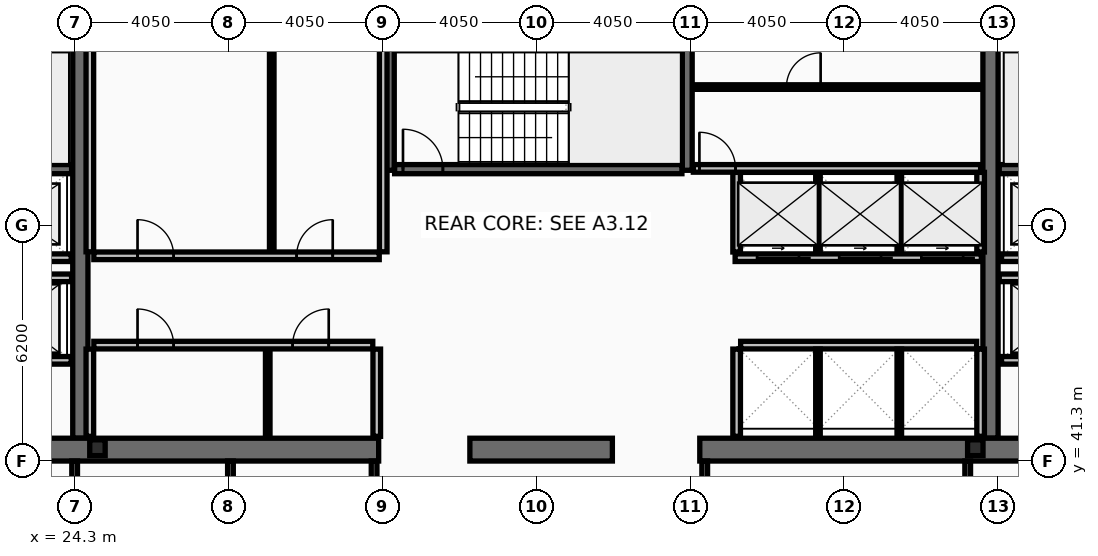
"""IFC4 building model, lengths in metres.
Left out: names, types, materials, properties, quantities, classifications, styles, units other than length and angle.
Written with IfcOpenShell. Run it as: python <this file> out.ifc"""

import sys

from ifc_helpers import new_model, si_unit, direction, frame, frame_2d, origin, origin_2d, place, context, subcontext, project, spatial, rectangle, i_section, extrude, element, fill, save


model = new_model("IFC4")
c1 = context("Model", 3, precision=1e-05, world=origin(), true_north=direction((0.0, 1.0)))
c2 = subcontext(c1, "Body", "Model", "MODEL_VIEW")
j1 = project(units=[si_unit("LENGTHUNIT", "METRE"), si_unit("PLANEANGLEUNIT", "RADIAN")], contexts=[c1])
p1 = place(None, origin())
s1 = spatial("IfcSite", under=j1, at=p1, CompositionType="ELEMENT")
p2 = place(p1, origin())
s2 = spatial("IfcBuilding", under=s1, at=p2, CompositionType="ELEMENT")
p3 = place(p2, frame((0.0, 0.0, 221.0)))
s3 = spatial("IfcBuildingStorey", under=s2, at=p3, CompositionType="ELEMENT", Elevation=221.0)
for number, where, z_axis, x_axis in (
    (1, (24.45, 41.9, 0.0), (0.0, 0.0, 1.0), (0.0, 1.0, 0.0)),
    (2, (48.4, 41.9, 0.0), (0.0, 0.0, 1.0), (0.0, 1.0, 0.0)),
):
    element("IfcWall", number, at=place(p3, frame(where, z_axis=z_axis, x_axis=x_axis)), inside=s3, PredefinedType="SHEAR", context=c2, shape_type="SweptSolid", body=[
        extrude(rectangle(XDim=11.2, YDim=0.4, at=frame_2d((5.6, 0.0))), origin(), (0.0, 0.0, 1.0), 3.44),
    ])
p4 = place(p3, frame((32.3, 41.6, 0.0), z_axis=(0.0, 0.0, 1.0), x_axis=(-1.0, 0.0, 0.0)))
e3 = element("IfcWall", 3, at=p4, inside=s3, PredefinedType="SHEAR", context=c2, shape_type="SweptSolid", body=[
    extrude(rectangle(XDim=11.45, YDim=0.6, at=frame_2d((5.725, 0.0))), origin(), (0.0, 0.0, 1.0), 3.44),
])
p5 = place(p3, frame((38.45, 41.6, 0.0), z_axis=(0.0, 0.0, 1.0), x_axis=(-1.0, 0.0, 0.0)))
e4 = element("IfcWall", 4, at=p5, inside=s3, PredefinedType="SHEAR", context=c2, shape_type="SweptSolid", body=[
    extrude(rectangle(XDim=3.75, YDim=0.6, at=frame_2d((1.875, 0.0))), origin(), (0.0, 0.0, 1.0), 3.44),
])
p6 = place(p3, frame((52.05, 41.6, 0.0), z_axis=(0.0, 0.0, 1.0), x_axis=(-1.0, 0.0, 0.0)))
e5 = element("IfcWall", 5, at=p6, inside=s3, PredefinedType="SHEAR", context=c2, shape_type="SweptSolid", body=[
    extrude(rectangle(XDim=11.3, YDim=0.6, at=frame_2d((5.65, 0.0))), origin(), (0.0, 0.0, 1.0), 3.44),
])
for number, where, z_axis, x_axis in (
    (6, (32.58, 48.95, 0.0), (0.0, 0.0, 1.0), (0.0, 1.0, 0.0)),
    (7, (40.42, 48.95, 0.0), (0.0, 0.0, 1.0), (0.0, 1.0, 0.0)),
):
    element("IfcWall", number, at=place(p3, frame(where, z_axis=z_axis, x_axis=x_axis)), inside=s3, PredefinedType="SHEAR", context=c2, shape_type="SweptSolid", body=[
        extrude(rectangle(XDim=4.15, YDim=0.26, at=frame_2d((2.075, 0.0))), origin(), (0.0, 0.0, 1.0), 3.44),
    ])
p7 = place(p3, frame((16.8, 48.98, 0.0), z_axis=(0.0, 0.0, 1.0), x_axis=(1.0, 0.0, 0.0)))
e8 = element("IfcWall", 8, at=p7, inside=s3, PredefinedType="SHEAR", context=c2, shape_type="SweptSolid", body=[
    extrude(rectangle(XDim=7.42, YDim=0.24, at=frame_2d((3.71, 0.0))), origin(), (0.0, 0.0, 1.0), 3.44),
])
p8 = place(p7, frame((0.22, 0.0, 0.0)))
e9 = element("IfcOpeningElement", 9, at=p8, cuts=e8, PredefinedType="OPENING", context=c2, shape_type="SweptSolid", body=[
    extrude(rectangle(XDim=1.05, YDim=2.15, at=frame_2d((0.525, 1.075))), frame((0.0, 0.13, 0.0), z_axis=(0.0, -1.0, 0.0), x_axis=(1.0, 0.0, 0.0)), (0.0, 0.0, 1.0), 0.26),
])
p9 = place(p3, frame((48.63, 48.98, 0.0), z_axis=(0.0, 0.0, 1.0), x_axis=(1.0, 0.0, 0.0)))
e10 = element("IfcWall", 10, at=p9, inside=s3, PredefinedType="SHEAR", context=c2, shape_type="SweptSolid", body=[
    extrude(rectangle(XDim=7.47, YDim=0.24, at=frame_2d((3.735, 0.0))), origin(), (0.0, 0.0, 1.0), 3.44),
])
p10 = place(p9, frame((6.2, 0.0, 0.0)))
e11 = element("IfcOpeningElement", 11, at=p10, cuts=e10, PredefinedType="OPENING", context=c2, shape_type="SweptSolid", body=[
    extrude(rectangle(XDim=1.05, YDim=2.15, at=frame_2d((0.525, 1.075))), frame((0.0, 0.13, 0.0), z_axis=(0.0, -1.0, 0.0), x_axis=(1.0, 0.0, 0.0)), (0.0, 0.0, 1.0), 0.26),
])
p11 = place(p3, frame((32.72, 48.98, 0.0), z_axis=(0.0, 0.0, 1.0), x_axis=(1.0, 0.0, 0.0)))
e12 = element("IfcWall", 12, at=p11, inside=s3, PredefinedType="SHEAR", context=c2, shape_type="SweptSolid", body=[
    extrude(rectangle(XDim=7.56, YDim=0.24, at=frame_2d((3.78, 0.0))), origin(), (0.0, 0.0, 1.0), 3.44),
])
p12 = place(p11, frame((0.22, 0.0, 0.0)))
e13 = element("IfcOpeningElement", 13, at=p12, cuts=e12, PredefinedType="OPENING", context=c2, shape_type="SweptSolid", body=[
    extrude(rectangle(XDim=1.05, YDim=2.15, at=frame_2d((0.525, 1.075))), frame((0.0, 0.13, 0.0), z_axis=(0.0, -1.0, 0.0), x_axis=(1.0, 0.0, 0.0)), (0.0, 0.0, 1.0), 0.26),
])
for number, where, z_axis, x_axis in (
    (14, (24.9, 41.65, 0.0), (0.0, 0.0, 1.0), (1.0, 0.0, 0.0)),
    (15, (48.0, 41.65, 0.0), (0.0, 0.0, 1.0), (1.0, 0.0, 0.0)),
):
    element("IfcColumn", number, at=place(p3, frame(where, z_axis=z_axis, x_axis=x_axis)), inside=s3, PredefinedType="COLUMN", context=c2, shape_type="SweptSolid", body=[
        extrude(i_section(OverallWidth=0.406, OverallDepth=0.416, WebThickness=0.03, FlangeThickness=0.048, at=origin_2d()), origin(), (0.0, 0.0, 1.0), 3.6),
    ])
p13 = place(p3, frame((51.61, 43.95, 0.0), z_axis=(0.0, 0.0, 1.0), x_axis=(-1.0, 0.0, 0.0)))
e16 = element("IfcWall", 16, at=p13, inside=s3, PredefinedType="PARTITIONING", context=c2, shape_type="SweptSolid", body=[
    extrude(rectangle(XDim=2.92, YDim=0.2, at=frame_2d((1.46, 0.0))), origin(), (0.0, 0.0, 1.0), 3.44),
])
p14 = place(p13, frame((0.81, 0.0, 0.0)))
e17 = element("IfcOpeningElement", 17, at=p14, cuts=e16, PredefinedType="OPENING", context=c2, shape_type="SweptSolid", body=[
    extrude(rectangle(XDim=1.3, YDim=2.18, at=frame_2d((0.65, 1.09))), frame((0.0, 0.11, 0.0), z_axis=(0.0, -1.0, 0.0), x_axis=(1.0, 0.0, 0.0)), (0.0, 0.0, 1.0), 0.22),
])
p15 = place(p3, frame((24.21, 43.95, 0.0), z_axis=(0.0, 0.0, 1.0), x_axis=(-1.0, 0.0, 0.0)))
e18 = element("IfcWall", 18, at=p15, inside=s3, PredefinedType="PARTITIONING", context=c2, shape_type="SweptSolid", body=[
    extrude(rectangle(XDim=2.97, YDim=0.2, at=frame_2d((1.485, 0.0))), origin(), (0.0, 0.0, 1.0), 3.44),
])
p16 = place(p15, frame((0.86, 0.0, 0.0)))
e19 = element("IfcOpeningElement", 19, at=p16, cuts=e18, PredefinedType="OPENING", context=c2, shape_type="SweptSolid", body=[
    extrude(rectangle(XDim=1.3, YDim=2.18, at=frame_2d((0.65, 1.09))), frame((0.0, 0.11, 0.0), z_axis=(0.0, -1.0, 0.0), x_axis=(1.0, 0.0, 0.0)), (0.0, 0.0, 1.0), 0.22),
])
p17 = place(p3, frame((51.61, 46.65, 0.0), z_axis=(0.0, 0.0, 1.0), x_axis=(-1.0, 0.0, 0.0)))
e20 = element("IfcWall", 20, at=p17, inside=s3, PredefinedType="PARTITIONING", context=c2, shape_type="SweptSolid", body=[
    extrude(rectangle(XDim=2.92, YDim=0.2, at=frame_2d((1.46, 0.0))), origin(), (0.0, 0.0, 1.0), 3.44),
])
p18 = place(p17, frame((0.86, 0.0, 0.0)))
e21 = element("IfcOpeningElement", 21, at=p18, cuts=e20, PredefinedType="OPENING", context=c2, shape_type="SweptSolid", body=[
    extrude(rectangle(XDim=1.2, YDim=2.18, at=frame_2d((0.6, 1.09))), frame((0.0, 0.11, 0.0), z_axis=(0.0, -1.0, 0.0), x_axis=(1.0, 0.0, 0.0)), (0.0, 0.0, 1.0), 0.22),
])
p19 = place(p3, frame((24.21, 46.65, 0.0), z_axis=(0.0, 0.0, 1.0), x_axis=(-1.0, 0.0, 0.0)))
e22 = element("IfcWall", 22, at=p19, inside=s3, PredefinedType="PARTITIONING", context=c2, shape_type="SweptSolid", body=[
    extrude(rectangle(XDim=2.97, YDim=0.2, at=frame_2d((1.485, 0.0))), origin(), (0.0, 0.0, 1.0), 3.44),
])
p20 = place(p19, frame((0.91, 0.0, 0.0)))
e23 = element("IfcOpeningElement", 23, at=p20, cuts=e22, PredefinedType="OPENING", context=c2, shape_type="SweptSolid", body=[
    extrude(rectangle(XDim=1.2, YDim=2.18, at=frame_2d((0.6, 1.09))), frame((0.0, 0.11, 0.0), z_axis=(0.0, -1.0, 0.0), x_axis=(1.0, 0.0, 0.0)), (0.0, 0.0, 1.0), 0.22),
])
p21 = place(p3, frame((48.16, 46.65, 0.0), z_axis=(0.0, 0.0, 1.0), x_axis=(-1.0, 0.0, 0.0)))
e24 = element("IfcWall", 24, at=p21, inside=s3, PredefinedType="PARTITIONING", context=c2, shape_type="SweptSolid", body=[
    extrude(rectangle(XDim=6.48, YDim=0.2, at=frame_2d((3.24, 0.0))), origin(), (0.0, 0.0, 1.0), 3.44),
])
p22 = place(p21, frame((4.8, 0.0, 0.0)))
e25 = element("IfcOpeningElement", 25, at=p22, cuts=e24, PredefinedType="OPENING", context=c2, shape_type="SweptSolid", body=[
    extrude(rectangle(XDim=1.1, YDim=2.18, at=frame_2d((0.55, 1.09))), frame((0.0, 0.11, 0.0), z_axis=(0.0, -1.0, 0.0), x_axis=(1.0, 0.0, 0.0)), (0.0, 0.0, 1.0), 0.22),
])
p23 = place(p21, frame((2.64, 0.0, 0.0)))
e26 = element("IfcOpeningElement", 26, at=p23, cuts=e24, PredefinedType="OPENING", context=c2, shape_type="SweptSolid", body=[
    extrude(rectangle(XDim=1.1, YDim=2.18, at=frame_2d((0.55, 1.09))), frame((0.0, 0.11, 0.0), z_axis=(0.0, -1.0, 0.0), x_axis=(1.0, 0.0, 0.0)), (0.0, 0.0, 1.0), 0.22),
])
p24 = place(p21, frame((0.48, 0.0, 0.0)))
e27 = element("IfcOpeningElement", 27, at=p24, cuts=e24, PredefinedType="OPENING", context=c2, shape_type="SweptSolid", body=[
    extrude(rectangle(XDim=1.1, YDim=2.18, at=frame_2d((0.55, 1.09))), frame((0.0, 0.11, 0.0), z_axis=(0.0, -1.0, 0.0), x_axis=(1.0, 0.0, 0.0)), (0.0, 0.0, 1.0), 0.22),
])
p25 = place(p3, frame((21.2, 46.12, 0.0), z_axis=(0.0, 0.0, 1.0), x_axis=(1.0, 0.0, 0.0)))
e28 = element("IfcWall", 28, at=p25, inside=s3, PredefinedType="PARTITIONING", context=c2, shape_type="SweptSolid", body=[
    extrude(rectangle(XDim=3.02, YDim=0.2, at=frame_2d((1.51, 0.0))), origin(), (0.0, 0.0, 1.0), 3.44),
])
p26 = place(p3, frame((48.63, 46.12, 0.0), z_axis=(0.0, 0.0, 1.0), x_axis=(1.0, 0.0, 0.0)))
e29 = element("IfcWall", 29, at=p26, inside=s3, PredefinedType="PARTITIONING", context=c2, shape_type="SweptSolid", body=[
    extrude(rectangle(XDim=3.07, YDim=0.2, at=frame_2d((1.535, 0.0))), origin(), (0.0, 0.0, 1.0), 3.44),
])
for number, where, z_axis, x_axis in (
    (30, (24.7, 46.805, 0.0), (0.0, 0.0, 1.0), (0.0, 1.0, 0.0)),
    (31, (32.42, 46.805, 0.0), (0.0, 0.0, 1.0), (0.0, 1.0, 0.0)),
):
    element("IfcWall", number, at=place(p3, frame(where, z_axis=z_axis, x_axis=x_axis)), inside=s3, PredefinedType="PARTITIONING", context=c2, shape_type="SweptSolid", body=[
        extrude(rectangle(XDim=5.99, YDim=0.2, at=frame_2d((2.995, 0.0))), origin(), (0.0, 0.0, 1.0), 3.44),
    ])
p27 = place(p3, frame((29.486, 46.805, 0.0), z_axis=(0.0, 0.0, 1.0), x_axis=(0.0, 1.0, 0.0)))
e32 = element("IfcWall", 32, at=p27, inside=s3, PredefinedType="PARTITIONING", context=c2, shape_type="SweptSolid", body=[
    extrude(rectangle(XDim=5.99, YDim=0.12, at=frame_2d((2.995, 0.0))), origin(), (0.0, 0.0, 1.0), 3.44),
])
p28 = place(p3, frame((24.805, 46.7, 0.0), z_axis=(0.0, 0.0, 1.0), x_axis=(1.0, 0.0, 0.0)))
e33 = element("IfcWall", 33, at=p28, inside=s3, PredefinedType="PARTITIONING", context=c2, shape_type="SweptSolid", body=[
    extrude(rectangle(XDim=7.51, YDim=0.2, at=frame_2d((3.755, 0.0))), origin(), (0.0, 0.0, 1.0), 3.44),
])
p29 = place(p28, frame((1.15, 0.0, 0.0)))
e34 = element("IfcOpeningElement", 34, at=p29, cuts=e33, PredefinedType="OPENING", context=c2, shape_type="SweptSolid", body=[
    extrude(rectangle(XDim=0.95, YDim=2.1, at=frame_2d((0.475, 1.05))), frame((0.0, 0.11, 0.0), z_axis=(0.0, -1.0, 0.0), x_axis=(1.0, 0.0, 0.0)), (0.0, 0.0, 1.0), 0.22),
])
p30 = place(p28, frame((5.336, 0.0, 0.0)))
e35 = element("IfcOpeningElement", 35, at=p30, cuts=e33, PredefinedType="OPENING", context=c2, shape_type="SweptSolid", body=[
    extrude(rectangle(XDim=0.95, YDim=2.1, at=frame_2d((0.475, 1.05))), frame((0.0, 0.11, 0.0), z_axis=(0.0, -1.0, 0.0), x_axis=(1.0, 0.0, 0.0)), (0.0, 0.0, 1.0), 0.22),
])
for number, where, z_axis, x_axis in (
    (36, (24.7, 41.95, 0.0), (0.0, 0.0, 1.0), (0.0, 1.0, 0.0)),
    (37, (32.25, 41.95, 0.0), (0.0, 0.0, 1.0), (0.0, 1.0, 0.0)),
):
    element("IfcWall", number, at=place(p3, frame(where, z_axis=z_axis, x_axis=x_axis)), inside=s3, PredefinedType="PARTITIONING", context=c2, shape_type="SweptSolid", body=[
        extrude(rectangle(XDim=2.295, YDim=0.2, at=frame_2d((1.147, 0.0))), origin(), (0.0, 0.0, 1.0), 3.44),
    ])
p31 = place(p3, frame((29.381, 41.95, 0.0), z_axis=(0.0, 0.0, 1.0), x_axis=(0.0, 1.0, 0.0)))
e38 = element("IfcWall", 38, at=p31, inside=s3, PredefinedType="PARTITIONING", context=c2, shape_type="SweptSolid", body=[
    extrude(rectangle(XDim=2.295, YDim=0.12, at=frame_2d((1.147, 0.0))), origin(), (0.0, 0.0, 1.0), 3.44),
])
p32 = place(p3, frame((24.805, 44.35, 0.0), z_axis=(0.0, 0.0, 1.0), x_axis=(1.0, 0.0, 0.0)))
e39 = element("IfcWall", 39, at=p32, inside=s3, PredefinedType="PARTITIONING", context=c2, shape_type="SweptSolid", body=[
    extrude(rectangle(XDim=7.34, YDim=0.2, at=frame_2d((3.67, 0.0))), origin(), (0.0, 0.0, 1.0), 3.44),
])
p33 = place(p32, frame((1.15, 0.0, 0.0)))
e40 = element("IfcOpeningElement", 40, at=p33, cuts=e39, PredefinedType="OPENING", context=c2, shape_type="SweptSolid", body=[
    extrude(rectangle(XDim=0.95, YDim=2.1, at=frame_2d((0.475, 1.05))), frame((0.0, 0.11, 0.0), z_axis=(0.0, -1.0, 0.0), x_axis=(1.0, 0.0, 0.0)), (0.0, 0.0, 1.0), 0.22),
])
p34 = place(p32, frame((5.231, 0.0, 0.0)))
e41 = element("IfcOpeningElement", 41, at=p34, cuts=e39, PredefinedType="OPENING", context=c2, shape_type="SweptSolid", body=[
    extrude(rectangle(XDim=0.95, YDim=2.1, at=frame_2d((0.475, 1.05))), frame((0.0, 0.11, 0.0), z_axis=(0.0, -1.0, 0.0), x_axis=(1.0, 0.0, 0.0)), (0.0, 0.0, 1.0), 0.22),
])
for number, where, z_axis, x_axis in (
    (42, (41.72, 46.8, 0.0), (0.0, 0.0, 1.0), (0.0, 1.0, 0.0)),
    (43, (48.14, 46.8, 0.0), (0.0, 0.0, 1.0), (0.0, 1.0, 0.0)),
):
    element("IfcWall", number, at=place(p3, frame(where, z_axis=z_axis, x_axis=x_axis)), inside=s3, PredefinedType="PARTITIONING", context=c2, shape_type="SweptSolid", body=[
        extrude(rectangle(XDim=2.095, YDim=0.2, at=frame_2d((1.047, 0.0))), origin(), (0.0, 0.0, 1.0), 3.44),
    ])
for number, where, z_axis, x_axis in (
    (44, (43.86, 46.8, 0.0), (0.0, 0.0, 1.0), (0.0, 1.0, 0.0)),
    (45, (46.0, 46.8, 0.0), (0.0, 0.0, 1.0), (0.0, 1.0, 0.0)),
):
    element("IfcWall", number, at=place(p3, frame(where, z_axis=z_axis, x_axis=x_axis)), inside=s3, PredefinedType="PARTITIONING", context=c2, shape_type="SweptSolid", body=[
        extrude(rectangle(XDim=2.095, YDim=0.12, at=frame_2d((1.047, 0.0))), origin(), (0.0, 0.0, 1.0), 3.44),
    ])
p35 = place(p3, frame((41.825, 44.35, 0.0), z_axis=(0.0, 0.0, 1.0), x_axis=(1.0, 0.0, 0.0)))
e46 = element("IfcWall", 46, at=p35, inside=s3, PredefinedType="PARTITIONING", context=c2, shape_type="SweptSolid", body=[
    extrude(rectangle(XDim=6.21, YDim=0.2, at=frame_2d((3.105, 0.0))), origin(), (0.0, 0.0, 1.0), 3.44),
])
for number, where, z_axis, x_axis in (
    (47, (41.72, 41.95, 0.0), (0.0, 0.0, 1.0), (0.0, 1.0, 0.0)),
    (48, (48.14, 41.95, 0.0), (0.0, 0.0, 1.0), (0.0, 1.0, 0.0)),
):
    element("IfcWall", number, at=place(p3, frame(where, z_axis=z_axis, x_axis=x_axis)), inside=s3, PredefinedType="PARTITIONING", context=c2, shape_type="SweptSolid", body=[
        extrude(rectangle(XDim=2.295, YDim=0.2, at=frame_2d((1.147, 0.0))), origin(), (0.0, 0.0, 1.0), 3.44),
    ])
for number, where, z_axis, x_axis in (
    (49, (43.86, 41.95, 0.0), (0.0, 0.0, 1.0), (0.0, 1.0, 0.0)),
    (50, (46.0, 41.95, 0.0), (0.0, 0.0, 1.0), (0.0, 1.0, 0.0)),
):
    element("IfcWall", number, at=place(p3, frame(where, z_axis=z_axis, x_axis=x_axis)), inside=s3, PredefinedType="PARTITIONING", context=c2, shape_type="SweptSolid", body=[
        extrude(rectangle(XDim=2.295, YDim=0.12, at=frame_2d((1.147, 0.0))), origin(), (0.0, 0.0, 1.0), 3.44),
    ])
p36 = place(p3, frame((40.58, 49.0, 0.0), z_axis=(0.0, 0.0, 1.0), x_axis=(1.0, 0.0, 0.0)))
e51 = element("IfcWall", 51, at=p36, inside=s3, PredefinedType="PARTITIONING", context=c2, shape_type="SweptSolid", body=[
    extrude(rectangle(XDim=7.56, YDim=0.2, at=frame_2d((3.78, 0.0))), origin(), (0.0, 0.0, 1.0), 3.44),
])
p37 = place(p36, frame((0.16, 0.0, 0.0)))
e52 = element("IfcOpeningElement", 52, at=p37, cuts=e51, PredefinedType="OPENING", context=c2, shape_type="SweptSolid", body=[
    extrude(rectangle(XDim=0.95, YDim=2.1, at=frame_2d((0.475, 1.05))), frame((0.0, 0.11, 0.0), z_axis=(0.0, -1.0, 0.0), x_axis=(1.0, 0.0, 0.0)), (0.0, 0.0, 1.0), 0.22),
])
p38 = place(p3, frame((40.63, 51.14, 0.0), z_axis=(0.0, 0.0, 1.0), x_axis=(1.0, 0.0, 0.0)))
e53 = element("IfcWall", 53, at=p38, inside=s3, PredefinedType="PARTITIONING", context=c2, shape_type="SweptSolid", body=[
    extrude(rectangle(XDim=7.46, YDim=0.12, at=frame_2d((3.73, 0.0))), origin(), (0.0, 0.0, 1.0), 3.44),
])
p39 = place(p38, frame((2.4, 0.0, 0.0)))
e54 = element("IfcOpeningElement", 54, at=p39, cuts=e53, PredefinedType="OPENING", context=c2, shape_type="SweptSolid", body=[
    extrude(rectangle(XDim=0.9, YDim=2.05, at=frame_2d((0.45, 1.025))), frame((0.0, 0.07, 0.0), z_axis=(0.0, -1.0, 0.0), x_axis=(1.0, 0.0, 0.0)), (0.0, 0.0, 1.0), 0.14),
])
for number, where, z_axis, x_axis in (
    (55, (24.3, 38.28, 0.0), (0.0, 0.0, 1.0), (0.0, 1.0, 0.0)),
    (56, (28.4, 38.28, 0.0), (0.0, 0.0, 1.0), (0.0, 1.0, 0.0)),
    (57, (32.18, 38.28, 0.0), (0.0, 0.0, 1.0), (0.0, 1.0, 0.0)),
    (58, (40.88, 38.28, 0.0), (0.0, 0.0, 1.0), (0.0, 1.0, 0.0)),
):
    element("IfcWall", number, at=place(p3, frame(where, z_axis=z_axis, x_axis=x_axis)), inside=s3, PredefinedType="PARTITIONING", context=c2, shape_type="SweptSolid", body=[
        extrude(rectangle(XDim=3.02, YDim=0.15, at=frame_2d((1.51, 0.0))), origin(), (0.0, 0.0, 1.0), 3.44),
    ])
p40 = place(p3, frame((47.8, 38.28, 0.0), z_axis=(0.0, 0.0, 1.0), x_axis=(0.0, 1.0, 0.0)))
e59 = element("IfcWall", 59, at=p40, inside=s3, PredefinedType="PARTITIONING", context=c2, shape_type="SweptSolid", body=[
    extrude(rectangle(XDim=3.02, YDim=0.15, at=frame_2d((1.51, 0.0))), origin(), (0.0, 0.0, 1.0), 2.78),
])
p41 = place(p12, origin())
e60 = element("IfcDoor", 60, at=p41, inside=s3, OperationType="SINGLE_SWING_LEFT", PredefinedType="DOOR", context=c2, shape_type="SweptSolid", body=[
    extrude(rectangle(XDim=1.05, YDim=2.15, at=frame_2d((0.525, 1.075))), frame((0.0, 0.025, 0.0), z_axis=(0.0, -1.0, 0.0), x_axis=(1.0, 0.0, 0.0)), (0.0, 0.0, 1.0), 0.05),
])
fill(e13, e60)
p42 = place(p22, origin())
e61 = element("IfcDoor", 61, at=p42, inside=s3, OperationType="SLIDING_TO_LEFT", PredefinedType="DOOR", context=c2, shape_type="SweptSolid", body=[
    extrude(rectangle(XDim=1.1, YDim=2.18, at=frame_2d((0.55, 1.09))), frame((0.0, 0.025, 0.0), z_axis=(0.0, -1.0, 0.0), x_axis=(1.0, 0.0, 0.0)), (0.0, 0.0, 1.0), 0.05),
])
fill(e25, e61)
p43 = place(p23, origin())
e62 = element("IfcDoor", 62, at=p43, inside=s3, OperationType="SLIDING_TO_LEFT", PredefinedType="DOOR", context=c2, shape_type="SweptSolid", body=[
    extrude(rectangle(XDim=1.1, YDim=2.18, at=frame_2d((0.55, 1.09))), frame((0.0, 0.025, 0.0), z_axis=(0.0, -1.0, 0.0), x_axis=(1.0, 0.0, 0.0)), (0.0, 0.0, 1.0), 0.05),
])
fill(e26, e62)
p44 = place(p24, origin())
e63 = element("IfcDoor", 63, at=p44, inside=s3, OperationType="SLIDING_TO_LEFT", PredefinedType="DOOR", context=c2, shape_type="SweptSolid", body=[
    extrude(rectangle(XDim=1.1, YDim=2.18, at=frame_2d((0.55, 1.09))), frame((0.0, 0.025, 0.0), z_axis=(0.0, -1.0, 0.0), x_axis=(1.0, 0.0, 0.0)), (0.0, 0.0, 1.0), 0.05),
])
fill(e27, e63)
p45 = place(p29, origin())
e64 = element("IfcDoor", 64, at=p45, inside=s3, OperationType="SINGLE_SWING_LEFT", PredefinedType="DOOR", context=c2, shape_type="SweptSolid", body=[
    extrude(rectangle(XDim=0.95, YDim=2.1, at=frame_2d((0.475, 1.05))), frame((0.0, 0.025, 0.0), z_axis=(0.0, -1.0, 0.0), x_axis=(1.0, 0.0, 0.0)), (0.0, 0.0, 1.0), 0.05),
])
fill(e34, e64)
p46 = place(p30, origin())
e65 = element("IfcDoor", 65, at=p46, inside=s3, OperationType="SINGLE_SWING_RIGHT", PredefinedType="DOOR", context=c2, shape_type="SweptSolid", body=[
    extrude(rectangle(XDim=0.95, YDim=2.1, at=frame_2d((0.475, 1.05))), frame((0.0, 0.025, 0.0), z_axis=(0.0, -1.0, 0.0), x_axis=(1.0, 0.0, 0.0)), (0.0, 0.0, 1.0), 0.05),
])
fill(e35, e65)
p47 = place(p33, origin())
e66 = element("IfcDoor", 66, at=p47, inside=s3, OperationType="SINGLE_SWING_LEFT", PredefinedType="DOOR", context=c2, shape_type="SweptSolid", body=[
    extrude(rectangle(XDim=0.95, YDim=2.1, at=frame_2d((0.475, 1.05))), frame((0.0, 0.025, 0.0), z_axis=(0.0, -1.0, 0.0), x_axis=(1.0, 0.0, 0.0)), (0.0, 0.0, 1.0), 0.05),
])
fill(e40, e66)
p48 = place(p34, origin())
e67 = element("IfcDoor", 67, at=p48, inside=s3, OperationType="SINGLE_SWING_RIGHT", PredefinedType="DOOR", context=c2, shape_type="SweptSolid", body=[
    extrude(rectangle(XDim=0.95, YDim=2.1, at=frame_2d((0.475, 1.05))), frame((0.0, 0.025, 0.0), z_axis=(0.0, -1.0, 0.0), x_axis=(1.0, 0.0, 0.0)), (0.0, 0.0, 1.0), 0.05),
])
fill(e41, e67)
p49 = place(p37, origin())
e68 = element("IfcDoor", 68, at=p49, inside=s3, OperationType="SINGLE_SWING_LEFT", PredefinedType="DOOR", context=c2, shape_type="SweptSolid", body=[
    extrude(rectangle(XDim=0.95, YDim=2.1, at=frame_2d((0.475, 1.05))), frame((0.0, 0.025, 0.0), z_axis=(0.0, -1.0, 0.0), x_axis=(1.0, 0.0, 0.0)), (0.0, 0.0, 1.0), 0.05),
])
fill(e52, e68)
p50 = place(p39, origin())
e69 = element("IfcDoor", 69, at=p50, inside=s3, OperationType="SINGLE_SWING_RIGHT", PredefinedType="DOOR", context=c2, shape_type="SweptSolid", body=[
    extrude(rectangle(XDim=0.9, YDim=2.05, at=frame_2d((0.45, 1.025))), frame((0.0, 0.025, 0.0), z_axis=(0.0, -1.0, 0.0), x_axis=(1.0, 0.0, 0.0)), (0.0, 0.0, 1.0), 0.05),
])
fill(e54, e69)
save(model, sys.argv[1])
